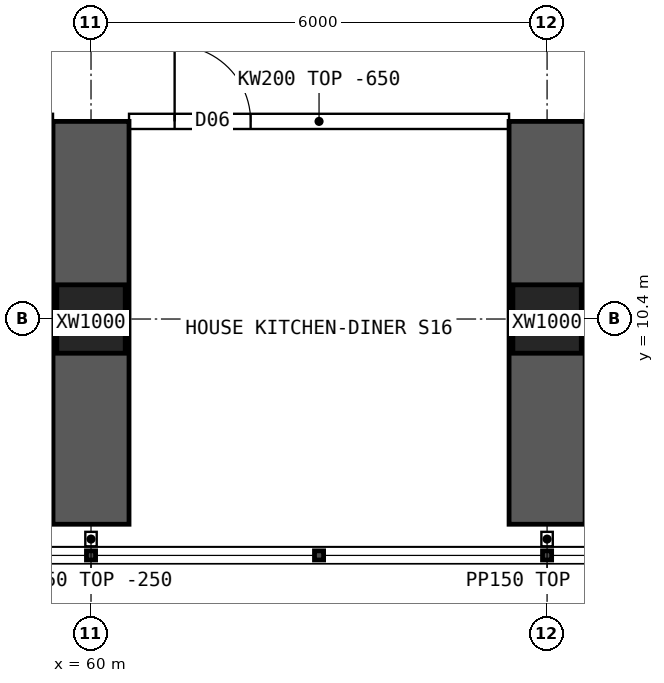
"""IFC4 building model, lengths in metres.
Left out: names, types, materials, properties, quantities, classifications, styles, units other than length and angle.
Written with IfcOpenShell. Run it as: python <this file> out.ifc"""

import sys

from ifc_helpers import new_model, si_unit, direction, frame, frame_2d, origin, origin_2d, place, context, subcontext, project, spatial, polyline, rectangle, hollow_rectangle, outline, extrude, element, fill, save


model = new_model("IFC4")
c1 = context("Model", 3, precision=1e-05, world=origin(), true_north=direction((0.0, 1.0)))
c2 = subcontext(c1, "Body", "Model", "MODEL_VIEW")
j1 = project(units=[si_unit("LENGTHUNIT", "METRE"), si_unit("PLANEANGLEUNIT", "RADIAN")], contexts=[c1])
p1 = place(None, origin())
s1 = spatial("IfcSite", under=j1, at=p1, CompositionType="ELEMENT")
p2 = place(p1, origin())
s2 = spatial("IfcBuilding", under=s1, at=p2, CompositionType="ELEMENT")
p3 = place(p2, frame((0.0, 0.0, 57.7)))
s3 = spatial("IfcBuildingStorey", under=s2, at=p3, CompositionType="ELEMENT", Elevation=57.7)
for number, where, z_axis, x_axis in (
    (1, (60.0, 10.4, 0.0), (0.0, 0.0, 1.0), (1.0, 0.0, 0.0)),
    (2, (66.0, 10.4, 0.0), (0.0, 0.0, 1.0), (1.0, 0.0, 0.0)),
):
    element("IfcColumn", number, at=place(p3, frame(where, z_axis=z_axis, x_axis=x_axis)), inside=s3, PredefinedType="COLUMN", context=c2, shape_type="SweptSolid", body=[
        extrude(hollow_rectangle(XDim=0.9, YDim=0.9, WallThickness=0.09, at=origin_2d()), origin(), (0.0, 0.0, 1.0), 3.75),
    ])
for number, where, z_axis, x_axis in (
    (3, (60.0, 7.7, 0.0), (0.0, 0.0, 1.0), (0.0, 1.0, 0.0)),
    (4, (66.0, 7.7, 0.0), (0.0, 0.0, 1.0), (0.0, 1.0, 0.0)),
):
    element("IfcWall", number, at=place(p3, frame(where, z_axis=z_axis, x_axis=x_axis)), inside=s3, PredefinedType="SHEAR", context=c2, shape_type="SweptSolid", body=[
        extrude(rectangle(XDim=5.3, YDim=1.0, at=frame_2d((2.65, 0.0))), origin(), (0.0, 0.0, 1.0), 3.75),
    ])
p4 = place(p3, frame((60.5, 13.0, 0.0), z_axis=(0.0, 0.0, 1.0), x_axis=(1.0, 0.0, 0.0)))
e5 = element("IfcWall", 5, at=p4, inside=s3, PredefinedType="SOLIDWALL", context=c2, shape_type="SweptSolid", body=[
    extrude(outline(polyline([(0.0, 0.0), (5.0, 0.0), (5.0, 3.1), (0.0, 3.1), (0.0, 0.0)])), frame((0.0, 0.1, 0.0), z_axis=(0.0, -1.0, 0.0), x_axis=(1.0, 0.0, 0.0)), (0.0, 0.0, 1.0), 0.2),
])
p5 = place(p4, frame((0.6, 0.0, 0.0)))
e6 = element("IfcOpeningElement", 6, at=p5, cuts=e5, PredefinedType="OPENING", context=c2, shape_type="SweptSolid", body=[
    extrude(rectangle(XDim=1.0, YDim=2.1, at=frame_2d((0.5, 1.05))), frame((0.0, 0.11, 0.0), z_axis=(0.0, -1.0, 0.0), x_axis=(1.0, 0.0, 0.0)), (0.0, 0.0, 1.0), 0.22),
])
for number, where, z_axis, x_axis in (
    (7, (60.0, 7.6, 0.0), (0.0, 0.0, 1.0), (0.0, -1.0, 0.0)),
    (8, (66.0, 7.6, 0.0), (0.0, 0.0, 1.0), (0.0, -1.0, 0.0)),
):
    element("IfcWall", number, at=place(p3, frame(where, z_axis=z_axis, x_axis=x_axis)), inside=s3, PredefinedType="PARTITIONING", context=c2, shape_type="SweptSolid", body=[
        extrude(rectangle(XDim=0.19, YDim=0.15, at=frame_2d((0.095, 0.0))), origin(), (0.0, 0.0, 1.0), 3.5),
    ])
p6 = place(p5, origin())
e9 = element("IfcDoor", 9, at=p6, inside=s3, OperationType="SINGLE_SWING_LEFT", PredefinedType="DOOR", context=c2, shape_type="SweptSolid", body=[
    extrude(rectangle(XDim=1.0, YDim=2.1, at=frame_2d((0.5, 1.05))), frame((0.0, 0.025, 0.0), z_axis=(0.0, -1.0, 0.0), x_axis=(1.0, 0.0, 0.0)), (0.0, 0.0, 1.0), 0.05),
])
fill(e6, e9)
save(model, sys.argv[1])
